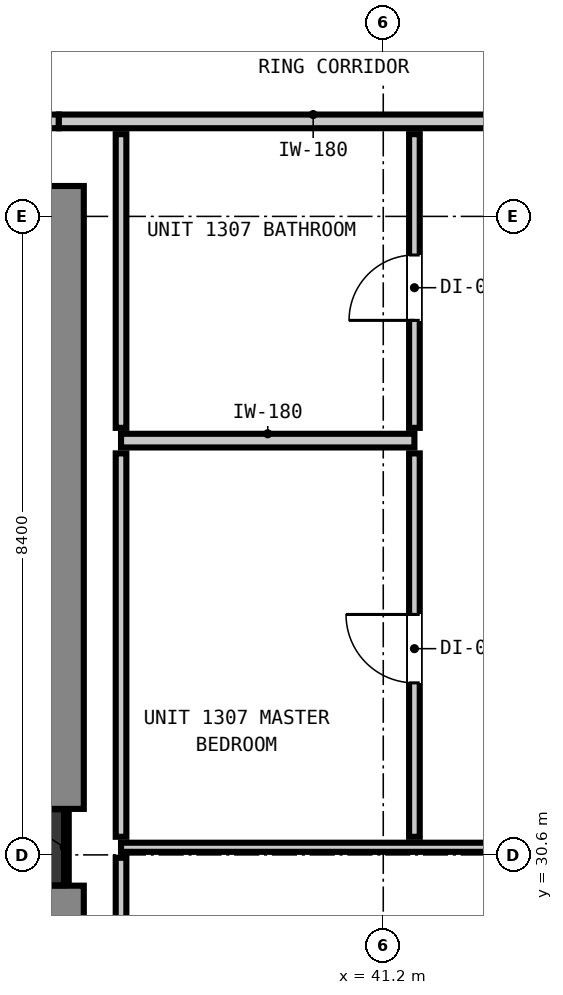
"""IFC4 building model, lengths in metres.
Left out: names, types, materials, properties, quantities, classifications, styles, units other than length and angle.
Written with IfcOpenShell. Run it as: python <this file> out.ifc"""

import sys

from ifc_helpers import new_model, si_unit, direction, frame, frame_2d, origin, origin_2d, place, context, subcontext, project, spatial, rectangle, extrude, element, fill, save


model = new_model("IFC4")
c1 = context("Model", 3, precision=1e-05, world=origin(), true_north=direction((0.0, 1.0)))
c2 = subcontext(c1, "Body", "Model", "MODEL_VIEW")
j1 = project(units=[si_unit("LENGTHUNIT", "METRE"), si_unit("PLANEANGLEUNIT", "RADIAN")], contexts=[c1])
p1 = place(None, origin())
s1 = spatial("IfcSite", under=j1, at=p1, CompositionType="ELEMENT")
p2 = place(p1, origin())
s2 = spatial("IfcBuilding", under=s1, at=p2, CompositionType="ELEMENT")
p3 = place(p2, frame((0.0, 0.0, 48.56)))
s3 = spatial("IfcBuildingStorey", under=s2, at=p3, CompositionType="ELEMENT", Elevation=48.56)
p4 = place(p3, frame((36.5, 30.7, 0.0), z_axis=(0.0, 0.0, 1.0), x_axis=(1.0, 0.0, 0.0)))
e1 = element("IfcColumn", 1, at=p4, inside=s3, PredefinedType="COLUMN", context=c2, shape_type="SweptSolid", body=[
    extrude(rectangle(XDim=1.0, YDim=1.0, at=origin_2d()), origin(), (0.0, 0.0, 1.0), 3.32),
])
p5 = place(p3, frame((36.66, 22.0, 0.0), z_axis=(0.0, 0.0, 1.0), x_axis=(0.0, 1.0, 0.0)))
e2 = element("IfcWall", 2, at=p5, inside=s3, PredefinedType="SHEAR", context=c2, shape_type="SweptSolid", body=[
    extrude(rectangle(XDim=8.195, YDim=1.2, at=frame_2d((4.098, 0.0))), origin(), (0.0, 0.0, 1.0), 3.32),
])
p6 = place(p3, frame((36.66, 31.205, 0.0), z_axis=(0.0, 0.0, 1.0), x_axis=(0.0, 1.0, 0.0)))
e3 = element("IfcWall", 3, at=p6, inside=s3, PredefinedType="SHEAR", context=c2, shape_type="SweptSolid", body=[
    extrude(rectangle(XDim=8.195, YDim=1.2, at=frame_2d((4.097, 0.0))), origin(), (0.0, 0.0, 1.0), 3.32),
])
p7 = place(p3, frame((37.75, 36.05, 0.0), z_axis=(0.0, 0.0, 1.0), x_axis=(1.0, 0.0, 0.0)))
e4 = element("IfcWall", 4, at=p7, inside=s3, PredefinedType="PARTITIONING", context=c2, shape_type="SweptSolid", body=[
    extrude(rectangle(XDim=3.86, YDim=0.18, at=frame_2d((1.93, 0.0))), origin(), (0.0, 0.0, 1.0), 3.06),
])
p8 = place(p3, frame((10.15, 40.25, 0.0), z_axis=(0.0, 0.0, 1.0), x_axis=(1.0, 0.0, 0.0)))
e5 = element("IfcWall", 5, at=p8, inside=s3, PredefinedType="PARTITIONING", context=c2, shape_type="SweptSolid", body=[
    extrude(rectangle(XDim=26.782, YDim=0.18, at=frame_2d((13.391, 0.0))), origin(), (0.0, 0.0, 1.0), 3.06),
])
p9 = place(p8, frame((7.285, 0.0, 0.0)))
e6 = element("IfcOpeningElement", 6, at=p9, cuts=e5, PredefinedType="OPENING", context=c2, shape_type="SweptSolid", body=[
    extrude(rectangle(XDim=1.4, YDim=2.15, at=frame_2d((0.7, 1.075))), frame((0.0, 0.1, 0.0), z_axis=(0.0, -1.0, 0.0), x_axis=(1.0, 0.0, 0.0)), (0.0, 0.0, 1.0), 0.2),
])
p10 = place(p8, frame((0.324, 0.0, 0.0)))
e7 = element("IfcOpeningElement", 7, at=p10, cuts=e5, PredefinedType="OPENING", context=c2, shape_type="SweptSolid", body=[
    extrude(rectangle(XDim=1.4, YDim=2.15, at=frame_2d((0.7, 1.075))), frame((0.0, 0.1, 0.0), z_axis=(0.0, -1.0, 0.0), x_axis=(1.0, 0.0, 0.0)), (0.0, 0.0, 1.0), 0.2),
])
p11 = place(p3, frame((36.932, 40.25, 0.0), z_axis=(0.0, 0.0, 1.0), x_axis=(1.0, 0.0, 0.0)))
e8 = element("IfcWall", 8, at=p11, inside=s3, PredefinedType="PARTITIONING", context=c2, shape_type="SweptSolid", body=[
    extrude(rectangle(XDim=12.386, YDim=0.18, at=frame_2d((6.193, 0.0))), origin(), (0.0, 0.0, 1.0), 2.445),
])
p12 = place(p11, frame((6.792, 0.0, 0.0)))
e9 = element("IfcOpeningElement", 9, at=p12, cuts=e8, PredefinedType="OPENING", context=c2, shape_type="SweptSolid", body=[
    extrude(rectangle(XDim=1.0, YDim=2.15, at=frame_2d((0.5, 1.075))), frame((0.0, 0.1, 0.0), z_axis=(0.0, -1.0, 0.0), x_axis=(1.0, 0.0, 0.0)), (0.0, 0.0, 1.0), 0.2),
])
p13 = place(p3, frame((37.75, 30.7, 0.0), z_axis=(0.0, 0.0, 1.0), x_axis=(1.0, 0.0, 0.0)))
e10 = element("IfcWall", 10, at=p13, inside=s3, PredefinedType="PARTITIONING", context=c2, shape_type="SweptSolid", body=[
    extrude(rectangle(XDim=11.328, YDim=0.12, at=frame_2d((5.664, 0.0))), origin(), (0.0, 0.0, 1.0), 2.295),
])
p14 = place(p3, frame((37.75, 21.348, 0.0), z_axis=(0.0, 0.0, 1.0), x_axis=(0.0, 1.0, 0.0)))
e11 = element("IfcWall", 11, at=p14, inside=s3, PredefinedType="PARTITIONING", context=c2, shape_type="SweptSolid", body=[
    extrude(rectangle(XDim=9.214, YDim=0.14, at=frame_2d((4.607, 0.0))), origin(), (0.0, 0.0, 1.0), 3.06),
])
p15 = place(p3, frame((37.75, 30.838, 0.0), z_axis=(0.0, 0.0, 1.0), x_axis=(0.0, 1.0, 0.0)))
e12 = element("IfcWall", 12, at=p15, inside=s3, PredefinedType="PARTITIONING", context=c2, shape_type="SweptSolid", body=[
    extrude(rectangle(XDim=5.044, YDim=0.14, at=frame_2d((2.522, 0.0))), origin(), (0.0, 0.0, 1.0), 3.06),
])
p16 = place(p3, frame((37.75, 36.218, 0.0), z_axis=(0.0, 0.0, 1.0), x_axis=(0.0, 1.0, 0.0)))
e13 = element("IfcWall", 13, at=p16, inside=s3, PredefinedType="PARTITIONING", context=c2, shape_type="SweptSolid", body=[
    extrude(rectangle(XDim=3.864, YDim=0.14, at=frame_2d((1.932, 0.0))), origin(), (0.0, 0.0, 1.0), 3.06),
])
p17 = place(p3, frame((41.61, 30.838, 0.0), z_axis=(0.0, 0.0, 1.0), x_axis=(0.0, 1.0, 0.0)))
e14 = element("IfcWall", 14, at=p17, inside=s3, PredefinedType="PARTITIONING", context=c2, shape_type="SweptSolid", body=[
    extrude(rectangle(XDim=5.044, YDim=0.14, at=frame_2d((2.522, 0.0))), origin(), (0.0, 0.0, 1.0), 3.06),
])
p18 = place(p17, frame((2.025, 0.0, 0.0)))
e15 = element("IfcOpeningElement", 15, at=p18, cuts=e14, PredefinedType="OPENING", context=c2, shape_type="SweptSolid", body=[
    extrude(rectangle(XDim=0.9, YDim=2.1, at=frame_2d((0.45, 1.05))), frame((0.0, 0.08, 0.0), z_axis=(0.0, -1.0, 0.0), x_axis=(1.0, 0.0, 0.0)), (0.0, 0.0, 1.0), 0.16),
])
p19 = place(p3, frame((41.61, 36.218, 0.0), z_axis=(0.0, 0.0, 1.0), x_axis=(0.0, 1.0, 0.0)))
e16 = element("IfcWall", 16, at=p19, inside=s3, PredefinedType="PARTITIONING", context=c2, shape_type="SweptSolid", body=[
    extrude(rectangle(XDim=3.864, YDim=0.14, at=frame_2d((1.932, 0.0))), origin(), (0.0, 0.0, 1.0), 3.06),
])
p20 = place(p19, frame((1.414, 0.0, 0.0)))
e17 = element("IfcOpeningElement", 17, at=p20, cuts=e16, PredefinedType="OPENING", context=c2, shape_type="SweptSolid", body=[
    extrude(rectangle(XDim=0.86, YDim=2.02, at=frame_2d((0.43, 1.01))), frame((0.0, 0.08, 0.0), z_axis=(0.0, -1.0, 0.0), x_axis=(1.0, 0.0, 0.0)), (0.0, 0.0, 1.0), 0.16),
])
p21 = place(p3, frame((37.032, 30.21, 0.0), z_axis=(0.0, 0.0, 1.0), x_axis=(0.0, 1.0, 0.0)))
e18 = element("IfcWall", 18, at=p21, inside=s3, PredefinedType="PARTITIONING", context=c2, shape_type="SweptSolid", body=[
    extrude(rectangle(XDim=0.98, YDim=0.06, at=frame_2d((0.49, 0.0))), origin(), (0.0, 0.0, 1.0), 1.45),
])
p22 = place(p20, origin())
e19 = element("IfcDoor", 19, at=p22, inside=s3, OperationType="SINGLE_SWING_LEFT", PredefinedType="DOOR", context=c2, shape_type="SweptSolid", body=[
    extrude(rectangle(XDim=0.86, YDim=2.02, at=frame_2d((0.43, 1.01))), frame((0.0, 0.025, 0.0), z_axis=(0.0, -1.0, 0.0), x_axis=(1.0, 0.0, 0.0)), (0.0, 0.0, 1.0), 0.05),
])
fill(e17, e19)
p23 = place(p18, origin())
e20 = element("IfcDoor", 20, at=p23, inside=s3, OperationType="SINGLE_SWING_RIGHT", PredefinedType="DOOR", context=c2, shape_type="SweptSolid", body=[
    extrude(rectangle(XDim=0.9, YDim=2.1, at=frame_2d((0.45, 1.05))), frame((0.0, 0.025, 0.0), z_axis=(0.0, -1.0, 0.0), x_axis=(1.0, 0.0, 0.0)), (0.0, 0.0, 1.0), 0.05),
])
fill(e15, e20)
save(model, sys.argv[1])
